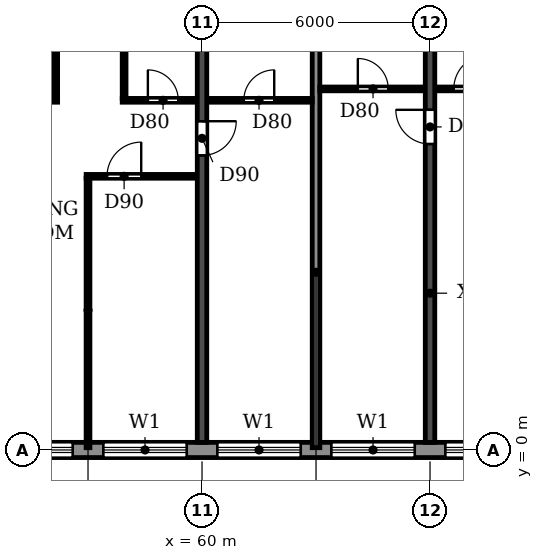
"""IFC4 building model, lengths in metres.
Left out: names, types, materials, properties, quantities, classifications, styles, units other than length and angle.
Written with IfcOpenShell. Run it as: python <this file> out.ifc"""

import sys

from ifc_helpers import new_model, si_unit, direction, frame, frame_2d, origin, place, context, subcontext, project, spatial, rectangle, extrude, element, fill, save


model = new_model("IFC4")
c1 = context("Model", 3, precision=1e-05, world=origin(), true_north=direction((0.0, 1.0)))
c2 = subcontext(c1, "Body", "Model", "MODEL_VIEW")
j1 = project(units=[si_unit("LENGTHUNIT", "METRE"), si_unit("PLANEANGLEUNIT", "RADIAN")], contexts=[c1])
p1 = place(None, origin())
s1 = spatial("IfcSite", under=j1, at=p1, CompositionType="ELEMENT")
p2 = place(p1, origin())
s2 = spatial("IfcBuilding", under=s1, at=p2, CompositionType="ELEMENT")
p3 = place(p2, frame((0.0, 0.0, 208.2)))
s3 = spatial("IfcBuildingStorey", under=s2, at=p3, CompositionType="ELEMENT", Elevation=208.2)
p4 = place(p3, frame((60.0, 0.2, 0.0), z_axis=(0.0, 0.0, 1.0), x_axis=(0.0, 1.0, 0.0)))
e1 = element("IfcWall", 1, at=p4, inside=s3, PredefinedType="SHEAR", context=c2, shape_type="SweptSolid", body=[
    extrude(rectangle(XDim=11.7, YDim=0.25, at=frame_2d((5.85, 0.0))), origin(), (0.0, 0.0, 1.0), 3.0),
])
p5 = place(p4, frame((7.55, 0.0, 0.0)))
e2 = element("IfcOpeningElement", 2, at=p5, cuts=e1, PredefinedType="OPENING", context=c2, shape_type="SweptSolid", body=[
    extrude(rectangle(XDim=0.9, YDim=2.1, at=frame_2d((0.45, 1.05))), frame((0.0, 0.135, 0.0), z_axis=(0.0, -1.0, 0.0), x_axis=(1.0, 0.0, 0.0)), (0.0, 0.0, 1.0), 0.27),
])
p6 = place(p3, frame((66.0, 0.2, 0.0), z_axis=(0.0, 0.0, 1.0), x_axis=(0.0, 1.0, 0.0)))
e3 = element("IfcWall", 3, at=p6, inside=s3, PredefinedType="SHEAR", context=c2, shape_type="SweptSolid", body=[
    extrude(rectangle(XDim=11.7, YDim=0.25, at=frame_2d((5.85, 0.0))), origin(), (0.0, 0.0, 1.0), 3.0),
])
p7 = place(p6, frame((7.85, 0.0, 0.0)))
e4 = element("IfcOpeningElement", 4, at=p7, cuts=e3, PredefinedType="OPENING", context=c2, shape_type="SweptSolid", body=[
    extrude(rectangle(XDim=0.9, YDim=2.1, at=frame_2d((0.45, 1.05))), frame((0.0, 0.135, 0.0), z_axis=(0.0, -1.0, 0.0), x_axis=(1.0, 0.0, 0.0)), (0.0, 0.0, 1.0), 0.27),
])
p8 = place(p3, frame((22.683, 0.0, 0.0), z_axis=(0.0, 0.0, 1.0), x_axis=(1.0, 0.0, 0.0)))
e5 = element("IfcWall", 5, at=p8, inside=s3, PredefinedType="STANDARD", context=c2, shape_type="SweptSolid", body=[
    extrude(rectangle(XDim=56.634, YDim=0.4, at=frame_2d((28.317, 0.0))), origin(), (0.0, 0.0, 1.0), 3.0),
])
p9 = place(p8, frame((1.917, 0.0, 0.0)))
e6 = element("IfcOpeningElement", 6, at=p9, cuts=e5, PredefinedType="OPENING", context=c2, shape_type="SweptSolid", body=[
    extrude(rectangle(XDim=1.8, YDim=2.4, at=frame_2d((0.9, 1.2))), frame((0.0, 0.21, 0.0), z_axis=(0.0, -1.0, 0.0), x_axis=(1.0, 0.0, 0.0)), (0.0, 0.0, 1.0), 0.42),
])
p10 = place(p8, frame((4.717, 0.0, 0.9)))
e7 = element("IfcOpeningElement", 7, at=p10, cuts=e5, PredefinedType="OPENING", context=c2, shape_type="SweptSolid", body=[
    extrude(rectangle(XDim=2.2, YDim=1.5, at=frame_2d((1.1, 0.75))), frame((0.0, 0.21, 0.0), z_axis=(0.0, -1.0, 0.0), x_axis=(1.0, 0.0, 0.0)), (0.0, 0.0, 1.0), 0.42),
])
p11 = place(p8, frame((7.717, 0.0, 0.9)))
e8 = element("IfcOpeningElement", 8, at=p11, cuts=e5, PredefinedType="OPENING", context=c2, shape_type="SweptSolid", body=[
    extrude(rectangle(XDim=2.2, YDim=1.5, at=frame_2d((1.1, 0.75))), frame((0.0, 0.21, 0.0), z_axis=(0.0, -1.0, 0.0), x_axis=(1.0, 0.0, 0.0)), (0.0, 0.0, 1.0), 0.42),
])
p12 = place(p8, frame((10.717, 0.0, 0.9)))
e9 = element("IfcOpeningElement", 9, at=p12, cuts=e5, PredefinedType="OPENING", context=c2, shape_type="SweptSolid", body=[
    extrude(rectangle(XDim=2.2, YDim=1.5, at=frame_2d((1.1, 0.75))), frame((0.0, 0.21, 0.0), z_axis=(0.0, -1.0, 0.0), x_axis=(1.0, 0.0, 0.0)), (0.0, 0.0, 1.0), 0.42),
])
p13 = place(p8, frame((13.917, 0.0, 0.0)))
e10 = element("IfcOpeningElement", 10, at=p13, cuts=e5, PredefinedType="OPENING", context=c2, shape_type="SweptSolid", body=[
    extrude(rectangle(XDim=1.8, YDim=2.4, at=frame_2d((0.9, 1.2))), frame((0.0, 0.21, 0.0), z_axis=(0.0, -1.0, 0.0), x_axis=(1.0, 0.0, 0.0)), (0.0, 0.0, 1.0), 0.42),
])
p14 = place(p8, frame((16.717, 0.0, 0.9)))
e11 = element("IfcOpeningElement", 11, at=p14, cuts=e5, PredefinedType="OPENING", context=c2, shape_type="SweptSolid", body=[
    extrude(rectangle(XDim=2.2, YDim=1.5, at=frame_2d((1.1, 0.75))), frame((0.0, 0.21, 0.0), z_axis=(0.0, -1.0, 0.0), x_axis=(1.0, 0.0, 0.0)), (0.0, 0.0, 1.0), 0.42),
])
p15 = place(p8, frame((19.717, 0.0, 0.9)))
e12 = element("IfcOpeningElement", 12, at=p15, cuts=e5, PredefinedType="OPENING", context=c2, shape_type="SweptSolid", body=[
    extrude(rectangle(XDim=2.2, YDim=1.5, at=frame_2d((1.1, 0.75))), frame((0.0, 0.21, 0.0), z_axis=(0.0, -1.0, 0.0), x_axis=(1.0, 0.0, 0.0)), (0.0, 0.0, 1.0), 0.42),
])
p16 = place(p8, frame((22.717, 0.0, 0.9)))
e13 = element("IfcOpeningElement", 13, at=p16, cuts=e5, PredefinedType="OPENING", context=c2, shape_type="SweptSolid", body=[
    extrude(rectangle(XDim=2.2, YDim=1.5, at=frame_2d((1.1, 0.75))), frame((0.0, 0.21, 0.0), z_axis=(0.0, -1.0, 0.0), x_axis=(1.0, 0.0, 0.0)), (0.0, 0.0, 1.0), 0.42),
])
p17 = place(p8, frame((25.917, 0.0, 0.0)))
e14 = element("IfcOpeningElement", 14, at=p17, cuts=e5, PredefinedType="OPENING", context=c2, shape_type="SweptSolid", body=[
    extrude(rectangle(XDim=1.8, YDim=2.4, at=frame_2d((0.9, 1.2))), frame((0.0, 0.21, 0.0), z_axis=(0.0, -1.0, 0.0), x_axis=(1.0, 0.0, 0.0)), (0.0, 0.0, 1.0), 0.42),
])
p18 = place(p8, frame((28.717, 0.0, 0.9)))
e15 = element("IfcOpeningElement", 15, at=p18, cuts=e5, PredefinedType="OPENING", context=c2, shape_type="SweptSolid", body=[
    extrude(rectangle(XDim=2.2, YDim=1.5, at=frame_2d((1.1, 0.75))), frame((0.0, 0.21, 0.0), z_axis=(0.0, -1.0, 0.0), x_axis=(1.0, 0.0, 0.0)), (0.0, 0.0, 1.0), 0.42),
])
p19 = place(p8, frame((31.717, 0.0, 0.9)))
e16 = element("IfcOpeningElement", 16, at=p19, cuts=e5, PredefinedType="OPENING", context=c2, shape_type="SweptSolid", body=[
    extrude(rectangle(XDim=2.2, YDim=1.5, at=frame_2d((1.1, 0.75))), frame((0.0, 0.21, 0.0), z_axis=(0.0, -1.0, 0.0), x_axis=(1.0, 0.0, 0.0)), (0.0, 0.0, 1.0), 0.42),
])
p20 = place(p8, frame((34.717, 0.0, 0.9)))
e17 = element("IfcOpeningElement", 17, at=p20, cuts=e5, PredefinedType="OPENING", context=c2, shape_type="SweptSolid", body=[
    extrude(rectangle(XDim=2.2, YDim=1.5, at=frame_2d((1.1, 0.75))), frame((0.0, 0.21, 0.0), z_axis=(0.0, -1.0, 0.0), x_axis=(1.0, 0.0, 0.0)), (0.0, 0.0, 1.0), 0.42),
])
p21 = place(p8, frame((37.717, 0.0, 0.9)))
e18 = element("IfcOpeningElement", 18, at=p21, cuts=e5, PredefinedType="OPENING", context=c2, shape_type="SweptSolid", body=[
    extrude(rectangle(XDim=2.2, YDim=1.5, at=frame_2d((1.1, 0.75))), frame((0.0, 0.21, 0.0), z_axis=(0.0, -1.0, 0.0), x_axis=(1.0, 0.0, 0.0)), (0.0, 0.0, 1.0), 0.42),
])
p22 = place(p8, frame((40.717, 0.0, 0.9)))
e19 = element("IfcOpeningElement", 19, at=p22, cuts=e5, PredefinedType="OPENING", context=c2, shape_type="SweptSolid", body=[
    extrude(rectangle(XDim=2.2, YDim=1.5, at=frame_2d((1.1, 0.75))), frame((0.0, 0.21, 0.0), z_axis=(0.0, -1.0, 0.0), x_axis=(1.0, 0.0, 0.0)), (0.0, 0.0, 1.0), 0.42),
])
p23 = place(p8, frame((43.717, 0.0, 0.9)))
e20 = element("IfcOpeningElement", 20, at=p23, cuts=e5, PredefinedType="OPENING", context=c2, shape_type="SweptSolid", body=[
    extrude(rectangle(XDim=2.2, YDim=1.5, at=frame_2d((1.1, 0.75))), frame((0.0, 0.21, 0.0), z_axis=(0.0, -1.0, 0.0), x_axis=(1.0, 0.0, 0.0)), (0.0, 0.0, 1.0), 0.42),
])
p24 = place(p8, frame((46.717, 0.0, 0.9)))
e21 = element("IfcOpeningElement", 21, at=p24, cuts=e5, PredefinedType="OPENING", context=c2, shape_type="SweptSolid", body=[
    extrude(rectangle(XDim=2.2, YDim=1.5, at=frame_2d((1.1, 0.75))), frame((0.0, 0.21, 0.0), z_axis=(0.0, -1.0, 0.0), x_axis=(1.0, 0.0, 0.0)), (0.0, 0.0, 1.0), 0.42),
])
p25 = place(p8, frame((49.717, 0.0, 0.9)))
e22 = element("IfcOpeningElement", 22, at=p25, cuts=e5, PredefinedType="OPENING", context=c2, shape_type="SweptSolid", body=[
    extrude(rectangle(XDim=2.2, YDim=1.5, at=frame_2d((1.1, 0.75))), frame((0.0, 0.21, 0.0), z_axis=(0.0, -1.0, 0.0), x_axis=(1.0, 0.0, 0.0)), (0.0, 0.0, 1.0), 0.42),
])
p26 = place(p8, frame((52.917, 0.0, 0.0)))
e23 = element("IfcOpeningElement", 23, at=p26, cuts=e5, PredefinedType="OPENING", context=c2, shape_type="SweptSolid", body=[
    extrude(rectangle(XDim=1.8, YDim=2.4, at=frame_2d((0.9, 1.2))), frame((0.0, 0.21, 0.0), z_axis=(0.0, -1.0, 0.0), x_axis=(1.0, 0.0, 0.0)), (0.0, 0.0, 1.0), 0.42),
])
p27 = place(p3, frame((63.0, 0.06, 0.0), z_axis=(0.0, 0.0, 1.0), x_axis=(0.0, 1.0, 0.0)))
e24 = element("IfcWall", 24, at=p27, inside=s3, PredefinedType="PARTITIONING", context=c2, shape_type="SweptSolid", body=[
    extrude(rectangle(XDim=11.83, YDim=0.2, at=frame_2d((5.915, 0.0))), origin(), (0.0, 0.0, 1.0), 3.0),
])
p28 = place(p3, frame((56.95, 7.2, 0.0), z_axis=(0.0, 0.0, 1.0), x_axis=(1.0, 0.0, 0.0)))
e25 = element("IfcWall", 25, at=p28, inside=s3, PredefinedType="PARTITIONING", context=c2, shape_type="SweptSolid", body=[
    extrude(rectangle(XDim=2.915, YDim=0.1, at=frame_2d((1.458, 0.0))), origin(), (0.0, 0.0, 1.0), 3.0),
])
p29 = place(p28, frame((0.55, 0.0, 0.0)))
e26 = element("IfcOpeningElement", 26, at=p29, cuts=e25, PredefinedType="OPENING", context=c2, shape_type="SweptSolid", body=[
    extrude(rectangle(XDim=0.9, YDim=2.1, at=frame_2d((0.45, 1.05))), frame((0.0, 0.06, 0.0), z_axis=(0.0, -1.0, 0.0), x_axis=(1.0, 0.0, 0.0)), (0.0, 0.0, 1.0), 0.12),
])
p30 = place(p3, frame((54.135, 9.2, 0.0), z_axis=(0.0, 0.0, 1.0), x_axis=(1.0, 0.0, 0.0)))
e27 = element("IfcWall", 27, at=p30, inside=s3, PredefinedType="PARTITIONING", context=c2, shape_type="SweptSolid", body=[
    extrude(rectangle(XDim=2.065, YDim=0.1, at=frame_2d((1.032, 0.0))), origin(), (0.0, 0.0, 1.0), 3.0),
])
p31 = place(p30, frame((0.49, 0.0, 0.0)))
e28 = element("IfcOpeningElement", 28, at=p31, cuts=e27, PredefinedType="OPENING", context=c2, shape_type="SweptSolid", body=[
    extrude(rectangle(XDim=0.9, YDim=2.1, at=frame_2d((0.45, 1.05))), frame((0.0, 0.06, 0.0), z_axis=(0.0, -1.0, 0.0), x_axis=(1.0, 0.0, 0.0)), (0.0, 0.0, 1.0), 0.12),
])
p32 = place(p3, frame((57.9, 9.2, 0.0), z_axis=(0.0, 0.0, 1.0), x_axis=(1.0, 0.0, 0.0)))
e29 = element("IfcWall", 29, at=p32, inside=s3, PredefinedType="PARTITIONING", context=c2, shape_type="SweptSolid", body=[
    extrude(rectangle(XDim=1.965, YDim=0.1, at=frame_2d((0.982, 0.0))), origin(), (0.0, 0.0, 1.0), 3.0),
])
p33 = place(p32, frame((0.675, 0.0, 0.0)))
e30 = element("IfcOpeningElement", 30, at=p33, cuts=e29, PredefinedType="OPENING", context=c2, shape_type="SweptSolid", body=[
    extrude(rectangle(XDim=0.8, YDim=2.1, at=frame_2d((0.4, 1.05))), frame((0.0, 0.06, 0.0), z_axis=(0.0, -1.0, 0.0), x_axis=(1.0, 0.0, 0.0)), (0.0, 0.0, 1.0), 0.12),
])
p34 = place(p3, frame((60.135, 9.2, 0.0), z_axis=(0.0, 0.0, 1.0), x_axis=(1.0, 0.0, 0.0)))
e31 = element("IfcWall", 31, at=p34, inside=s3, PredefinedType="PARTITIONING", context=c2, shape_type="SweptSolid", body=[
    extrude(rectangle(XDim=2.765, YDim=0.1, at=frame_2d((1.382, 0.0))), origin(), (0.0, 0.0, 1.0), 3.0),
])
p35 = place(p34, frame((0.965, 0.0, 0.0)))
e32 = element("IfcOpeningElement", 32, at=p35, cuts=e31, PredefinedType="OPENING", context=c2, shape_type="SweptSolid", body=[
    extrude(rectangle(XDim=0.8, YDim=2.1, at=frame_2d((0.4, 1.05))), frame((0.0, 0.06, 0.0), z_axis=(0.0, -1.0, 0.0), x_axis=(1.0, 0.0, 0.0)), (0.0, 0.0, 1.0), 0.12),
])
p36 = place(p3, frame((63.1, 9.5, 0.0), z_axis=(0.0, 0.0, 1.0), x_axis=(1.0, 0.0, 0.0)))
e33 = element("IfcWall", 33, at=p36, inside=s3, PredefinedType="PARTITIONING", context=c2, shape_type="SweptSolid", body=[
    extrude(rectangle(XDim=2.765, YDim=0.1, at=frame_2d((1.382, 0.0))), origin(), (0.0, 0.0, 1.0), 3.0),
])
p37 = place(p36, frame((1.0, 0.0, 0.0)))
e34 = element("IfcOpeningElement", 34, at=p37, cuts=e33, PredefinedType="OPENING", context=c2, shape_type="SweptSolid", body=[
    extrude(rectangle(XDim=0.8, YDim=2.1, at=frame_2d((0.4, 1.05))), frame((0.0, 0.06, 0.0), z_axis=(0.0, -1.0, 0.0), x_axis=(1.0, 0.0, 0.0)), (0.0, 0.0, 1.0), 0.12),
])
p38 = place(p3, frame((66.135, 9.5, 0.0), z_axis=(0.0, 0.0, 1.0), x_axis=(1.0, 0.0, 0.0)))
e35 = element("IfcWall", 35, at=p38, inside=s3, PredefinedType="PARTITIONING", context=c2, shape_type="SweptSolid", body=[
    extrude(rectangle(XDim=2.065, YDim=0.1, at=frame_2d((1.032, 0.0))), origin(), (0.0, 0.0, 1.0), 3.0),
])
p39 = place(p38, frame((0.49, 0.0, 0.0)))
e36 = element("IfcOpeningElement", 36, at=p39, cuts=e35, PredefinedType="OPENING", context=c2, shape_type="SweptSolid", body=[
    extrude(rectangle(XDim=0.9, YDim=2.1, at=frame_2d((0.45, 1.05))), frame((0.0, 0.06, 0.0), z_axis=(0.0, -1.0, 0.0), x_axis=(1.0, 0.0, 0.0)), (0.0, 0.0, 1.0), 0.12),
])
p40 = place(p3, frame((56.15, 9.25, 0.0), z_axis=(0.0, 0.0, 1.0), x_axis=(0.0, 1.0, 0.0)))
e37 = element("IfcWall", 37, at=p40, inside=s3, PredefinedType="PARTITIONING", context=c2, shape_type="SweptSolid", body=[
    extrude(rectangle(XDim=2.64, YDim=0.1, at=frame_2d((1.32, 0.0))), origin(), (0.0, 0.0, 1.0), 3.0),
])
p41 = place(p3, frame((57.0, 0.06, 0.0), z_axis=(0.0, 0.0, 1.0), x_axis=(0.0, 1.0, 0.0)))
e38 = element("IfcWall", 38, at=p41, inside=s3, PredefinedType="PARTITIONING", context=c2, shape_type="SweptSolid", body=[
    extrude(rectangle(XDim=7.09, YDim=0.1, at=frame_2d((3.545, 0.0))), origin(), (0.0, 0.0, 1.0), 3.0),
])
p42 = place(p3, frame((57.95, 9.25, 0.0), z_axis=(0.0, 0.0, 1.0), x_axis=(0.0, 1.0, 0.0)))
e39 = element("IfcWall", 39, at=p42, inside=s3, PredefinedType="PARTITIONING", context=c2, shape_type="SweptSolid", body=[
    extrude(rectangle(XDim=2.64, YDim=0.1, at=frame_2d((1.32, 0.0))), origin(), (0.0, 0.0, 1.0), 3.0),
])
p43 = place(p19, origin())
e40 = element("IfcWindow", 40, at=p43, inside=s3, PartitioningType="DOUBLE_PANEL_HORIZONTAL", PredefinedType="WINDOW", context=c2, shape_type="SweptSolid", body=[
    extrude(rectangle(XDim=2.2, YDim=1.5, at=frame_2d((1.1, 0.75))), frame((0.0, 0.03, 0.0), z_axis=(0.0, -1.0, 0.0), x_axis=(1.0, 0.0, 0.0)), (0.0, 0.0, 1.0), 0.06),
])
fill(e16, e40)
p44 = place(p20, origin())
e41 = element("IfcWindow", 41, at=p44, inside=s3, PartitioningType="DOUBLE_PANEL_HORIZONTAL", PredefinedType="WINDOW", context=c2, shape_type="SweptSolid", body=[
    extrude(rectangle(XDim=2.2, YDim=1.5, at=frame_2d((1.1, 0.75))), frame((0.0, 0.03, 0.0), z_axis=(0.0, -1.0, 0.0), x_axis=(1.0, 0.0, 0.0)), (0.0, 0.0, 1.0), 0.06),
])
fill(e17, e41)
p45 = place(p21, origin())
e42 = element("IfcWindow", 42, at=p45, inside=s3, PartitioningType="DOUBLE_PANEL_HORIZONTAL", PredefinedType="WINDOW", context=c2, shape_type="SweptSolid", body=[
    extrude(rectangle(XDim=2.2, YDim=1.5, at=frame_2d((1.1, 0.75))), frame((0.0, 0.03, 0.0), z_axis=(0.0, -1.0, 0.0), x_axis=(1.0, 0.0, 0.0)), (0.0, 0.0, 1.0), 0.06),
])
fill(e18, e42)
p46 = place(p22, origin())
e43 = element("IfcWindow", 43, at=p46, inside=s3, PartitioningType="DOUBLE_PANEL_HORIZONTAL", PredefinedType="WINDOW", context=c2, shape_type="SweptSolid", body=[
    extrude(rectangle(XDim=2.2, YDim=1.5, at=frame_2d((1.1, 0.75))), frame((0.0, 0.03, 0.0), z_axis=(0.0, -1.0, 0.0), x_axis=(1.0, 0.0, 0.0)), (0.0, 0.0, 1.0), 0.06),
])
fill(e19, e43)
p47 = place(p23, origin())
e44 = element("IfcWindow", 44, at=p47, inside=s3, PartitioningType="DOUBLE_PANEL_HORIZONTAL", PredefinedType="WINDOW", context=c2, shape_type="SweptSolid", body=[
    extrude(rectangle(XDim=2.2, YDim=1.5, at=frame_2d((1.1, 0.75))), frame((0.0, 0.03, 0.0), z_axis=(0.0, -1.0, 0.0), x_axis=(1.0, 0.0, 0.0)), (0.0, 0.0, 1.0), 0.06),
])
fill(e20, e44)
p48 = place(p35, origin())
e45 = element("IfcDoor", 45, at=p48, inside=s3, OperationType="SINGLE_SWING_RIGHT", PredefinedType="DOOR", context=c2, shape_type="SweptSolid", body=[
    extrude(rectangle(XDim=0.8, YDim=2.1, at=frame_2d((0.4, 1.05))), frame((0.0, 0.025, 0.0), z_axis=(0.0, -1.0, 0.0), x_axis=(1.0, 0.0, 0.0)), (0.0, 0.0, 1.0), 0.05),
])
fill(e32, e45)
p49 = place(p29, origin())
e46 = element("IfcDoor", 46, at=p49, inside=s3, OperationType="SINGLE_SWING_RIGHT", PredefinedType="DOOR", context=c2, shape_type="SweptSolid", body=[
    extrude(rectangle(XDim=0.9, YDim=2.1, at=frame_2d((0.45, 1.05))), frame((0.0, 0.025, 0.0), z_axis=(0.0, -1.0, 0.0), x_axis=(1.0, 0.0, 0.0)), (0.0, 0.0, 1.0), 0.05),
])
fill(e26, e46)
p50 = place(p33, origin())
e47 = element("IfcDoor", 47, at=p50, inside=s3, OperationType="SINGLE_SWING_LEFT", PredefinedType="DOOR", context=c2, shape_type="SweptSolid", body=[
    extrude(rectangle(XDim=0.8, YDim=2.1, at=frame_2d((0.4, 1.05))), frame((0.0, 0.025, 0.0), z_axis=(0.0, -1.0, 0.0), x_axis=(1.0, 0.0, 0.0)), (0.0, 0.0, 1.0), 0.05),
])
fill(e30, e47)
p51 = place(p5, frame((0.9, 0.0, 0.0), z_axis=(0.0, 0.0, 1.0), x_axis=(-1.0, 0.0, 0.0)))
e48 = element("IfcDoor", 48, at=p51, inside=s3, OperationType="SINGLE_SWING_LEFT", PredefinedType="DOOR", context=c2, shape_type="SweptSolid", body=[
    extrude(rectangle(XDim=0.9, YDim=2.1, at=frame_2d((0.45, 1.05))), frame((0.0, 0.025, 0.0), z_axis=(0.0, -1.0, 0.0), x_axis=(1.0, 0.0, 0.0)), (0.0, 0.0, 1.0), 0.05),
])
fill(e2, e48)
p52 = place(p37, origin())
e49 = element("IfcDoor", 49, at=p52, inside=s3, OperationType="SINGLE_SWING_LEFT", PredefinedType="DOOR", context=c2, shape_type="SweptSolid", body=[
    extrude(rectangle(XDim=0.8, YDim=2.1, at=frame_2d((0.4, 1.05))), frame((0.0, 0.025, 0.0), z_axis=(0.0, -1.0, 0.0), x_axis=(1.0, 0.0, 0.0)), (0.0, 0.0, 1.0), 0.05),
])
fill(e34, e49)
p53 = place(p7, origin())
e50 = element("IfcDoor", 50, at=p53, inside=s3, OperationType="SINGLE_SWING_RIGHT", PredefinedType="DOOR", context=c2, shape_type="SweptSolid", body=[
    extrude(rectangle(XDim=0.9, YDim=2.1, at=frame_2d((0.45, 1.05))), frame((0.0, 0.025, 0.0), z_axis=(0.0, -1.0, 0.0), x_axis=(1.0, 0.0, 0.0)), (0.0, 0.0, 1.0), 0.05),
])
fill(e4, e50)
p54 = place(p39, origin())
e51 = element("IfcDoor", 51, at=p54, inside=s3, OperationType="SINGLE_SWING_RIGHT", PredefinedType="DOOR", context=c2, shape_type="SweptSolid", body=[
    extrude(rectangle(XDim=0.9, YDim=2.1, at=frame_2d((0.45, 1.05))), frame((0.0, 0.025, 0.0), z_axis=(0.0, -1.0, 0.0), x_axis=(1.0, 0.0, 0.0)), (0.0, 0.0, 1.0), 0.05),
])
fill(e36, e51)
save(model, sys.argv[1])
